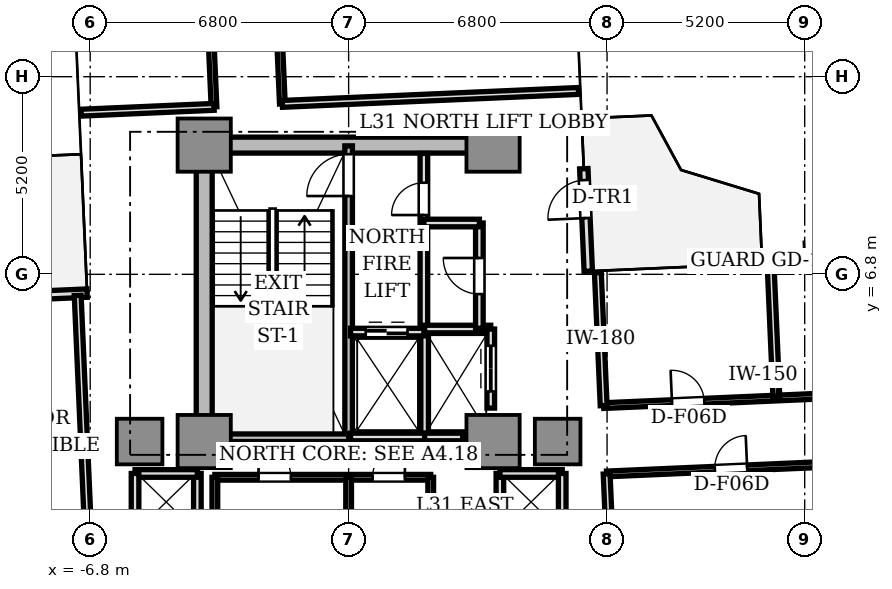
"""IFC4 building model, lengths in metres.
Left out: names, types, materials, properties, quantities, classifications, styles, units other than length and angle.
Written with IfcOpenShell. Run it as: python <this file> out.ifc"""

import sys

from ifc_helpers import new_model, si_unit, direction, frame, frame_2d, origin, origin_2d, place, context, subcontext, project, spatial, rectangle, extrude, source, transform, mapped, element, fill, save


model = new_model("IFC4")
c1 = context("Model", 3, precision=1e-05, world=origin(), true_north=direction((0.0, 1.0)))
c2 = subcontext(c1, "Body", "Model", "MODEL_VIEW")
j1 = project(units=[si_unit("LENGTHUNIT", "METRE"), si_unit("PLANEANGLEUNIT", "RADIAN")], contexts=[c1])
p1 = place(None, origin())
s1 = spatial("IfcSite", under=j1, at=p1, CompositionType="ELEMENT")
p2 = place(p1, origin())
s2 = spatial("IfcBuilding", under=s1, at=p2, CompositionType="ELEMENT")
p3 = place(p2, frame((0.0, 0.0, 114.8)))
s3 = spatial("IfcBuildingStorey", under=s2, at=p3, CompositionType="ELEMENT", Elevation=114.8)
p4 = place(p3, frame((-3.55, 10.2, 0.0), z_axis=(0.0, 0.0, 1.0), x_axis=(1.0, 0.0, 0.0)))
e1 = element("IfcWall", 1, at=p4, inside=s3, PredefinedType="SHEAR", context=c2, shape_type="SweptSolid", body=[
    extrude(rectangle(XDim=7.1, YDim=0.42, at=frame_2d((3.55, 0.0))), origin(), (0.0, 0.0, 1.0), 3.11),
])
p5 = place(p3, frame((-3.8, 2.85, 0.0), z_axis=(0.0, 0.0, 1.0), x_axis=(0.0, 1.0, 0.0)))
e2 = element("IfcWall", 2, at=p5, inside=s3, PredefinedType="SHEAR", context=c2, shape_type="SweptSolid", body=[
    extrude(rectangle(XDim=6.9, YDim=0.42, at=frame_2d((3.45, 0.0))), origin(), (0.0, 0.0, 1.0), 3.11),
])
m1 = source(origin(), c2, "Body", "SweptSolid", [
    extrude(rectangle(XDim=1.4, YDim=1.4, at=origin_2d()), origin(), (0.0, 0.0, 1.0), 3.11),
])
for number, where, z_axis, x_axis in (
    (3, (-3.8, 2.4, 0.0), (0.0, 0.0, 1.0), (1.0, 0.0, 0.0)),
    (4, (3.8, 2.4, 0.0), (0.0, 0.0, 1.0), (1.0, 0.0, 0.0)),
    (5, (-3.8, 10.2, 0.0), (0.0, 0.0, 1.0), (1.0, 0.0, 0.0)),
    (6, (3.8, 10.2, 0.0), (0.0, 0.0, 1.0), (1.0, 0.0, 0.0)),
):
    element("IfcColumn", number, at=place(p3, frame(where, z_axis=z_axis, x_axis=x_axis)), inside=s3, PredefinedType="COLUMN", context=c2, shape_type="MappedRepresentation", body=[
        mapped(m1, transform((0.0, 0.0, 0.0), scale=1.0)),
    ])
m2 = source(origin(), c2, "Body", "SweptSolid", [
    extrude(rectangle(XDim=1.2, YDim=1.2, at=origin_2d()), origin(), (0.0, 0.0, 1.0), 3.11),
])
for number, where, z_axis, x_axis in (
    (7, (5.5, 2.4, 0.0), (0.0, 0.0, 1.0), (1.0, 0.0, 0.0)),
    (8, (-5.5, 2.4, 0.0), (0.0, 0.0, 1.0), (1.0, 0.0, 0.0)),
):
    element("IfcColumn", number, at=place(p3, frame(where, z_axis=z_axis, x_axis=x_axis)), inside=s3, PredefinedType="COLUMN", context=c2, shape_type="MappedRepresentation", body=[
        mapped(m2, transform((0.0, 0.0, 0.0), scale=1.0)),
    ])
p6 = place(p3, frame((6.306, 6.882, 0.0), z_axis=(0.0, 0.0, 1.0), x_axis=(-0.043672655174, 0.999045894436, 0.0)))
e9 = element("IfcWall", 9, at=p6, inside=s3, PredefinedType="STANDARD", context=c2, shape_type="SweptSolid", body=[
    extrude(rectangle(XDim=2.7, YDim=0.22, at=frame_2d((1.35, 0.0))), origin(), (0.0, 0.0, 1.0), 3.11),
])
p7 = place(p6, frame((1.4, 0.0, 0.0)))
e10 = element("IfcOpeningElement", 10, at=p7, cuts=e9, PredefinedType="OPENING", context=c2, shape_type="SweptSolid", body=[
    extrude(rectangle(XDim=1.0, YDim=2.2, at=frame_2d((0.5, 1.1))), frame((0.0, 0.12, 0.0), z_axis=(0.0, -1.0, 0.0), x_axis=(1.0, 0.0, 0.0)), (0.0, 0.0, 1.0), 0.24),
])
p8 = place(p3, frame((-6.882, 6.306, 0.0), z_axis=(0.0, 0.0, 1.0), x_axis=(-0.999045894436, -0.043672655174, 0.0)))
e11 = element("IfcWall", 11, at=p8, inside=s3, PredefinedType="STANDARD", context=c2, shape_type="SweptSolid", body=[
    extrude(rectangle(XDim=2.7, YDim=0.22, at=frame_2d((1.35, 0.0))), origin(), (0.0, 0.0, 1.0), 3.11),
])
p9 = place(p8, frame((1.4, 0.0, 0.0)))
e12 = element("IfcOpeningElement", 12, at=p9, cuts=e11, PredefinedType="OPENING", context=c2, shape_type="SweptSolid", body=[
    extrude(rectangle(XDim=1.0, YDim=2.2, at=frame_2d((0.5, 1.1))), frame((0.0, 0.12, 0.0), z_axis=(0.0, -1.0, 0.0), x_axis=(1.0, 0.0, 0.0)), (0.0, 0.0, 1.0), 0.24),
])
p10 = place(p3, frame((0.0, 2.5, 0.0), z_axis=(0.0, 0.0, 1.0), x_axis=(0.0, 1.0, 0.0)))
e13 = element("IfcWall", 13, at=p10, inside=s3, PredefinedType="SOLIDWALL", context=c2, shape_type="SweptSolid", body=[
    extrude(rectangle(XDim=7.68, YDim=0.2, at=frame_2d((3.84, 0.0))), origin(), (0.0, 0.0, 1.0), 3.11),
])
p11 = place(p10, frame((6.36, 0.0, 0.0)))
e14 = element("IfcOpeningElement", 14, at=p11, cuts=e13, PredefinedType="OPENING", context=c2, shape_type="SweptSolid", body=[
    extrude(rectangle(XDim=1.1, YDim=2.15, at=frame_2d((0.55, 1.075))), frame((0.0, 0.11, 0.0), z_axis=(0.0, -1.0, 0.0), x_axis=(1.0, 0.0, 0.0)), (0.0, 0.0, 1.0), 0.22),
])
p12 = place(p3, frame((-3.72, 2.5, 0.0), z_axis=(0.0, 0.0, 1.0), x_axis=(1.0, 0.0, 0.0)))
e15 = element("IfcWall", 15, at=p12, inside=s3, PredefinedType="SOLIDWALL", context=c2, shape_type="SweptSolid", body=[
    extrude(rectangle(XDim=3.72, YDim=0.2, at=frame_2d((1.86, 0.0))), origin(), (0.0, 0.0, 1.0), 3.11),
])
p13 = place(p3, frame((1.98, 5.32, 0.0), z_axis=(0.0, 0.0, 1.0), x_axis=(0.0, 1.0, 0.0)))
e16 = element("IfcWall", 16, at=p13, inside=s3, PredefinedType="SOLIDWALL", context=c2, shape_type="SweptSolid", body=[
    extrude(rectangle(XDim=4.66, YDim=0.2, at=frame_2d((2.33, 0.0))), origin(), (0.0, 0.0, 1.0), 2.66),
])
p14 = place(p13, frame((3.04, 0.0, 0.0)))
e17 = element("IfcOpeningElement", 17, at=p14, cuts=e16, PredefinedType="OPENING", context=c2, shape_type="SweptSolid", body=[
    extrude(rectangle(XDim=0.85, YDim=2.1, at=frame_2d((0.425, 1.05))), frame((0.0, 0.11, 0.0), z_axis=(0.0, -1.0, 0.0), x_axis=(1.0, 0.0, 0.0)), (0.0, 0.0, 1.0), 0.22),
])
p15 = place(p3, frame((2.0, 2.5, 0.0), z_axis=(0.0, 0.0, 1.0), x_axis=(0.0, 1.0, 0.0)))
e18 = element("IfcWall", 18, at=p15, inside=s3, PredefinedType="SOLIDWALL", context=c2, shape_type="SweptSolid", body=[
    extrude(rectangle(XDim=2.78, YDim=0.2, at=frame_2d((1.39, 0.0))), origin(), (0.0, 0.0, 1.0), 2.66),
])
p16 = place(p3, frame((0.05, 2.52, 0.0), z_axis=(0.0, 0.0, 1.0), x_axis=(1.0, 0.0, 0.0)))
e19 = element("IfcWall", 19, at=p16, inside=s3, PredefinedType="SOLIDWALL", context=c2, shape_type="SweptSolid", body=[
    extrude(rectangle(XDim=1.95, YDim=0.2, at=frame_2d((0.975, 0.0))), origin(), (0.0, 0.0, 1.0), 2.66),
])
p17 = place(p3, frame((0.05, 5.28, 0.0), z_axis=(0.0, 0.0, 1.0), x_axis=(1.0, 0.0, 0.0)))
e20 = element("IfcWall", 20, at=p17, inside=s3, PredefinedType="SOLIDWALL", context=c2, shape_type="SweptSolid", body=[
    extrude(rectangle(XDim=1.93, YDim=0.2, at=frame_2d((0.965, 0.0))), origin(), (0.0, 0.0, 1.0), 2.66),
])
p18 = place(p17, frame((0.4, 0.0, 0.0)))
e21 = element("IfcOpeningElement", 21, at=p18, cuts=e20, PredefinedType="OPENING", context=c2, shape_type="SweptSolid", body=[
    extrude(rectangle(XDim=1.1, YDim=2.2, at=frame_2d((0.55, 1.1))), frame((0.0, 0.11, 0.0), z_axis=(0.0, -1.0, 0.0), x_axis=(1.0, 0.0, 0.0)), (0.0, 0.0, 1.0), 0.22),
])
p19 = place(p3, frame((2.0, 2.52, 0.0), z_axis=(0.0, 0.0, 1.0), x_axis=(1.0, 0.0, 0.0)))
e22 = element("IfcWall", 22, at=p19, inside=s3, PredefinedType="SOLIDWALL", context=c2, shape_type="SweptSolid", body=[
    extrude(rectangle(XDim=1.0, YDim=0.2, at=frame_2d((0.5, 0.0))), origin(), (0.0, 0.0, 1.0), 2.66),
])
p20 = place(p3, frame((2.0, 5.36, 0.0), z_axis=(0.0, 0.0, 1.0), x_axis=(1.0, 0.0, 0.0)))
e23 = element("IfcWall", 23, at=p20, inside=s3, PredefinedType="SOLIDWALL", context=c2, shape_type="SweptSolid", body=[
    extrude(rectangle(XDim=1.74, YDim=0.2, at=frame_2d((0.87, 0.0))), origin(), (0.0, 0.0, 1.0), 2.66),
])
p21 = place(p3, frame((3.74, 3.28, 0.0), z_axis=(0.0, 0.0, 1.0), x_axis=(0.0, 1.0, 0.0)))
e24 = element("IfcWall", 24, at=p21, inside=s3, PredefinedType="SOLIDWALL", context=c2, shape_type="SweptSolid", body=[
    extrude(rectangle(XDim=2.08, YDim=0.2, at=frame_2d((1.04, 0.0))), origin(), (0.0, 0.0, 1.0), 2.66),
])
p22 = place(p21, frame((0.44, 0.0, 0.0)))
e25 = element("IfcOpeningElement", 25, at=p22, cuts=e24, PredefinedType="OPENING", context=c2, shape_type="SweptSolid", body=[
    extrude(rectangle(XDim=1.2, YDim=2.2, at=frame_2d((0.6, 1.1))), frame((0.0, 0.11, 0.0), z_axis=(0.0, -1.0, 0.0), x_axis=(1.0, 0.0, 0.0)), (0.0, 0.0, 1.0), 0.22),
])
p23 = place(p3, frame((3.98, -1.56, 0.0), z_axis=(0.0, 0.0, 1.0), x_axis=(0.0, 1.0, 0.0)))
e26 = element("IfcWall", 26, at=p23, inside=s3, PredefinedType="SOLIDWALL", context=c2, shape_type="SweptSolid", body=[
    extrude(rectangle(XDim=3.12, YDim=0.2, at=frame_2d((1.56, 0.0))), origin(), (0.0, 0.0, 1.0), 2.28),
])
p24 = place(p3, frame((3.98, 1.56, 0.0), z_axis=(0.0, 0.0, 1.0), x_axis=(1.0, 0.0, 0.0)))
e27 = element("IfcWall", 27, at=p24, inside=s3, PredefinedType="SOLIDWALL", context=c2, shape_type="SweptSolid", body=[
    extrude(rectangle(XDim=1.64, YDim=0.2, at=frame_2d((0.82, 0.0))), origin(), (0.0, 0.0, 1.0), 2.66),
])
p25 = place(p3, frame((5.62, 0.0, 0.0), z_axis=(0.0, 0.0, 1.0), x_axis=(0.0, 1.0, 0.0)))
e28 = element("IfcWall", 28, at=p25, inside=s3, PredefinedType="SOLIDWALL", context=c2, shape_type="SweptSolid", body=[
    extrude(rectangle(XDim=1.56, YDim=0.2, at=frame_2d((0.78, 0.0))), origin(), (0.0, 0.0, 1.0), 2.66),
])
p26 = place(p3, frame((-3.98, -1.56, 0.0), z_axis=(0.0, 0.0, 1.0), x_axis=(0.0, 1.0, 0.0)))
e29 = element("IfcWall", 29, at=p26, inside=s3, PredefinedType="SOLIDWALL", context=c2, shape_type="SweptSolid", body=[
    extrude(rectangle(XDim=3.12, YDim=0.2, at=frame_2d((1.56, 0.0))), origin(), (0.0, 0.0, 1.0), 2.28),
])
p27 = place(p3, frame((-5.62, 1.56, 0.0), z_axis=(0.0, 0.0, 1.0), x_axis=(1.0, 0.0, 0.0)))
e30 = element("IfcWall", 30, at=p27, inside=s3, PredefinedType="SOLIDWALL", context=c2, shape_type="SweptSolid", body=[
    extrude(rectangle(XDim=1.64, YDim=0.2, at=frame_2d((0.82, 0.0))), origin(), (0.0, 0.0, 1.0), 2.66),
])
p28 = place(p3, frame((-5.62, 0.0, 0.0), z_axis=(0.0, 0.0, 1.0), x_axis=(0.0, 1.0, 0.0)))
e31 = element("IfcWall", 31, at=p28, inside=s3, PredefinedType="SOLIDWALL", context=c2, shape_type="SweptSolid", body=[
    extrude(rectangle(XDim=1.56, YDim=0.2, at=frame_2d((0.78, 0.0))), origin(), (0.0, 0.0, 1.0), 2.66),
])
p29 = place(p3, frame((3.44, 5.38, 0.0), z_axis=(0.0, 0.0, 1.0), x_axis=(0.0, 1.0, 0.0)))
e32 = element("IfcWall", 32, at=p29, inside=s3, PredefinedType="SOLIDWALL", context=c2, shape_type="SweptSolid", body=[
    extrude(rectangle(XDim=2.77, YDim=0.2, at=frame_2d((1.385, 0.0))), origin(), (0.0, 0.0, 1.0), 2.66),
])
p30 = place(p29, frame((0.9, 0.0, 0.0)))
e33 = element("IfcOpeningElement", 33, at=p30, cuts=e32, PredefinedType="OPENING", context=c2, shape_type="SweptSolid", body=[
    extrude(rectangle(XDim=0.95, YDim=2.15, at=frame_2d((0.475, 1.075))), frame((0.0, 0.11, 0.0), z_axis=(0.0, -1.0, 0.0), x_axis=(1.0, 0.0, 0.0)), (0.0, 0.0, 1.0), 0.22),
])
p31 = place(p3, frame((1.98, 8.15, 0.0), z_axis=(0.0, 0.0, 1.0), x_axis=(1.0, 0.0, 0.0)))
e34 = element("IfcWall", 34, at=p31, inside=s3, PredefinedType="SOLIDWALL", context=c2, shape_type="SweptSolid", body=[
    extrude(rectangle(XDim=1.46, YDim=0.2, at=frame_2d((0.73, 0.0))), origin(), (0.0, 0.0, 1.0), 2.66),
])
p32 = place(p3, frame((-3.52, 1.46, 0.0), z_axis=(0.0, 0.0, 1.0), x_axis=(1.0, 0.0, 0.0)))
e35 = element("IfcWall", 35, at=p32, inside=s3, PredefinedType="PARTITIONING", context=c2, shape_type="SweptSolid", body=[
    extrude(rectangle(XDim=5.68, YDim=0.15, at=frame_2d((2.84, 0.0))), origin(), (0.0, 0.0, 1.0), 2.66),
])
p33 = place(p32, frame((1.15, 0.0, 0.0)))
e36 = element("IfcOpeningElement", 36, at=p33, cuts=e35, PredefinedType="OPENING", context=c2, shape_type="SweptSolid", body=[
    extrude(rectangle(XDim=0.85, YDim=2.1, at=frame_2d((0.425, 1.05))), frame((0.0, 0.085, 0.0), z_axis=(0.0, -1.0, 0.0), x_axis=(1.0, 0.0, 0.0)), (0.0, 0.0, 1.0), 0.17),
])
p34 = place(p32, frame((4.15, 0.0, 0.0)))
e37 = element("IfcOpeningElement", 37, at=p34, cuts=e35, PredefinedType="OPENING", context=c2, shape_type="SweptSolid", body=[
    extrude(rectangle(XDim=0.85, YDim=2.1, at=frame_2d((0.425, 1.05))), frame((0.0, 0.085, 0.0), z_axis=(0.0, -1.0, 0.0), x_axis=(1.0, 0.0, 0.0)), (0.0, 0.0, 1.0), 0.17),
])
p35 = place(p3, frame((-3.52, 0.1, 0.0), z_axis=(0.0, 0.0, 1.0), x_axis=(0.0, 1.0, 0.0)))
e38 = element("IfcWall", 38, at=p35, inside=s3, PredefinedType="PARTITIONING", context=c2, shape_type="SweptSolid", body=[
    extrude(rectangle(XDim=1.36, YDim=0.15, at=frame_2d((0.68, 0.0))), origin(), (0.0, 0.0, 1.0), 2.28),
])
for number, where, z_axis, x_axis in (
    (39, (2.16, 0.1, 0.0), (0.0, 0.0, 1.0), (0.0, 1.0, 0.0)),
    (40, (0.0, 0.1, 0.0), (0.0, 0.0, 1.0), (0.0, 1.0, 0.0)),
):
    element("IfcWall", number, at=place(p3, frame(where, z_axis=z_axis, x_axis=x_axis)), inside=s3, PredefinedType="PARTITIONING", context=c2, shape_type="SweptSolid", body=[
        extrude(rectangle(XDim=1.36, YDim=0.15, at=frame_2d((0.68, 0.0))), origin(), (0.0, 0.0, 1.0), 2.66),
    ])
p36 = place(p3, frame((6.71, 3.346, 0.0), z_axis=(0.0, 0.0, 1.0), x_axis=(0.999048041751, 0.043623505985, 0.0)))
e41 = element("IfcWall", 41, at=p36, inside=s3, PredefinedType="PARTITIONING", context=c2, shape_type="SweptSolid", body=[
    extrude(rectangle(XDim=9.1, YDim=0.15, at=frame_2d((4.55, 0.0))), origin(), (0.0, 0.0, 1.0), 2.63),
])
p37 = place(p36, frame((1.8, 0.0, 0.0)))
e42 = element("IfcOpeningElement", 42, at=p37, cuts=e41, PredefinedType="OPENING", context=c2, shape_type="SweptSolid", body=[
    extrude(rectangle(XDim=0.85, YDim=2.1, at=frame_2d((0.425, 1.05))), frame((0.0, 0.085, 0.0), z_axis=(0.0, -1.0, 0.0), x_axis=(1.0, 0.0, 0.0)), (0.0, 0.0, 1.0), 0.17),
])
p38 = place(p36, frame((6.35, 0.0, 0.0)))
e43 = element("IfcOpeningElement", 43, at=p38, cuts=e41, PredefinedType="OPENING", context=c2, shape_type="SweptSolid", body=[
    extrude(rectangle(XDim=0.85, YDim=2.1, at=frame_2d((0.425, 1.05))), frame((0.0, 0.085, 0.0), z_axis=(0.0, -1.0, 0.0), x_axis=(1.0, 0.0, 0.0)), (0.0, 0.0, 1.0), 0.17),
])
p39 = place(p3, frame((6.789, 1.548, 0.0), z_axis=(0.0, 0.0, 1.0), x_axis=(0.999048041751, 0.043623505985, 0.0)))
e44 = element("IfcWall", 44, at=p39, inside=s3, PredefinedType="PARTITIONING", context=c2, shape_type="SweptSolid", body=[
    extrude(rectangle(XDim=9.1, YDim=0.15, at=frame_2d((4.55, 0.0))), origin(), (0.0, 0.0, 1.0), 2.66),
])
p40 = place(p39, frame((2.85, 0.0, 0.0)))
e45 = element("IfcOpeningElement", 45, at=p40, cuts=e44, PredefinedType="OPENING", context=c2, shape_type="SweptSolid", body=[
    extrude(rectangle(XDim=0.85, YDim=2.1, at=frame_2d((0.425, 1.05))), frame((0.0, 0.085, 0.0), z_axis=(0.0, -1.0, 0.0), x_axis=(1.0, 0.0, 0.0)), (0.0, 0.0, 1.0), 0.17),
])
p41 = place(p3, frame((6.71, 3.346, 0.0), z_axis=(0.0, 0.0, 1.0), x_axis=(-0.043597663116, 0.999049169846, 0.0)))
e46 = element("IfcWall", 46, at=p41, inside=s3, PredefinedType="PARTITIONING", context=c2, shape_type="SweptSolid", body=[
    extrude(rectangle(XDim=3.5, YDim=0.18, at=frame_2d((1.75, 0.0))), origin(), (0.0, 0.0, 1.0), 2.66),
])
p42 = place(p3, frame((7.129, -6.245, 0.0), z_axis=(0.0, 0.0, 1.0), x_axis=(-0.043600217373, 0.999049058378, 0.0)))
e47 = element("IfcWall", 47, at=p42, inside=s3, PredefinedType="PARTITIONING", context=c2, shape_type="SweptSolid", body=[
    extrude(rectangle(XDim=7.8, YDim=0.18, at=frame_2d((3.9, 0.0))), origin(), (0.0, 0.0, 1.0), 2.66),
])
p43 = place(p3, frame((11.256, 3.544, 0.0), z_axis=(0.0, 0.0, 1.0), x_axis=(-0.043597663116, 0.999049169846, 0.0)))
e48 = element("IfcWall", 48, at=p43, inside=s3, PredefinedType="PARTITIONING", context=c2, shape_type="SweptSolid", body=[
    extrude(rectangle(XDim=3.5, YDim=0.18, at=frame_2d((1.75, 0.0))), origin(), (0.0, 0.0, 1.0), 2.66),
])
p44 = place(p3, frame((-3.542, 11.206, 0.0), z_axis=(0.0, 0.0, 1.0), x_axis=(-0.043604692074, 0.999048863084, 0.0)))
e49 = element("IfcWall", 49, at=p44, inside=s3, PredefinedType="PARTITIONING", context=c2, shape_type="SweptSolid", body=[
    extrude(rectangle(XDim=9.3, YDim=0.15, at=frame_2d((4.65, 0.0))), origin(), (0.0, 0.0, 1.0), 2.66),
])
p45 = place(p44, frame((1.85, 0.0, 0.0)))
e50 = element("IfcOpeningElement", 50, at=p45, cuts=e49, PredefinedType="OPENING", context=c2, shape_type="SweptSolid", body=[
    extrude(rectangle(XDim=0.85, YDim=2.1, at=frame_2d((0.425, 1.05))), frame((0.0, 0.085, 0.0), z_axis=(0.0, -1.0, 0.0), x_axis=(1.0, 0.0, 0.0)), (0.0, 0.0, 1.0), 0.17),
])
p46 = place(p44, frame((6.5, 0.0, 0.0)))
e51 = element("IfcOpeningElement", 51, at=p46, cuts=e49, PredefinedType="OPENING", context=c2, shape_type="SweptSolid", body=[
    extrude(rectangle(XDim=0.85, YDim=2.1, at=frame_2d((0.425, 1.05))), frame((0.0, 0.085, 0.0), z_axis=(0.0, -1.0, 0.0), x_axis=(1.0, 0.0, 0.0)), (0.0, 0.0, 1.0), 0.17),
])
p47 = place(p3, frame((-1.744, 11.285, 0.0), z_axis=(0.0, 0.0, 1.0), x_axis=(-0.043630894187, 0.999047719117, 0.0)))
e52 = element("IfcWall", 52, at=p47, inside=s3, PredefinedType="PARTITIONING", context=c2, shape_type="SweptSolid", body=[
    extrude(rectangle(XDim=9.3, YDim=0.15, at=frame_2d((4.65, 0.0))), origin(), (0.0, 0.0, 1.0), 2.66),
])
p48 = place(p47, frame((2.95, 0.0, 0.0)))
e53 = element("IfcOpeningElement", 53, at=p48, cuts=e52, PredefinedType="OPENING", context=c2, shape_type="SweptSolid", body=[
    extrude(rectangle(XDim=0.85, YDim=2.1, at=frame_2d((0.425, 1.05))), frame((0.0, 0.085, 0.0), z_axis=(0.0, -1.0, 0.0), x_axis=(1.0, 0.0, 0.0)), (0.0, 0.0, 1.0), 0.17),
])
p49 = place(p3, frame((-3.542, 11.206, 0.0), z_axis=(0.0, 0.0, 1.0), x_axis=(-0.999046129111, -0.04366728647, 0.0)))
e54 = element("IfcWall", 54, at=p49, inside=s3, PredefinedType="PARTITIONING", context=c2, shape_type="SweptSolid", body=[
    extrude(rectangle(XDim=3.5, YDim=0.18, at=frame_2d((1.75, 0.0))), origin(), (0.0, 0.0, 1.0), 2.66),
])
p50 = place(p3, frame((6.049, 11.625, 0.0), z_axis=(0.0, 0.0, 1.0), x_axis=(-0.999047634936, -0.043632821702, 0.0)))
e55 = element("IfcWall", 55, at=p50, inside=s3, PredefinedType="PARTITIONING", context=c2, shape_type="SweptSolid", body=[
    extrude(rectangle(XDim=7.8, YDim=0.18, at=frame_2d((3.9, 0.0))), origin(), (0.0, 0.0, 1.0), 2.66),
])
p51 = place(p3, frame((-7.129, 6.245, 0.0), z_axis=(0.0, 0.0, 1.0), x_axis=(0.043600217373, -0.999049058378, 0.0)))
e56 = element("IfcWall", 56, at=p51, inside=s3, PredefinedType="PARTITIONING", context=c2, shape_type="SweptSolid", body=[
    extrude(rectangle(XDim=7.8, YDim=0.18, at=frame_2d((3.9, 0.0))), origin(), (0.0, 0.0, 1.0), 2.66),
])
m3 = source(origin(), c2, "Body", "SweptSolid", [
    extrude(rectangle(XDim=1.0, YDim=0.05, at=origin_2d()), origin(), (0.0, 0.0, 1.0), 2.2),
])
p52 = place(p7, frame((0.5, 0.0, 0.0)))
e57 = element("IfcDoor", 57, at=p52, inside=s3, OperationType="SINGLE_SWING_LEFT", PredefinedType="DOOR", context=c2, shape_type="MappedRepresentation", body=[
    mapped(m3, transform((0.0, 0.0, 0.0), scale=1.0)),
])
fill(e10, e57)
m4 = source(origin(), c2, "Body", "SweptSolid", [
    extrude(rectangle(XDim=1.1, YDim=0.05, at=origin_2d()), origin(), (0.0, 0.0, 1.0), 2.15),
])
p53 = place(p11, frame((0.55, 0.0, 0.0)))
e58 = element("IfcDoor", 58, at=p53, inside=s3, OperationType="SINGLE_SWING_LEFT", PredefinedType="DOOR", context=c2, shape_type="MappedRepresentation", body=[
    mapped(m4, transform((0.0, 0.0, 0.0), scale=1.0)),
])
fill(e14, e58)
m5 = source(origin(), c2, "Body", "SweptSolid", [
    extrude(rectangle(XDim=0.85, YDim=0.05, at=origin_2d()), origin(), (0.0, 0.0, 1.0), 2.1),
])
p54 = place(p14, frame((0.425, 0.0, 0.0)))
e59 = element("IfcDoor", 59, at=p54, inside=s3, OperationType="SINGLE_SWING_LEFT", PredefinedType="DOOR", context=c2, shape_type="MappedRepresentation", body=[
    mapped(m5, transform((0.0, 0.0, 0.0), scale=1.0)),
])
fill(e17, e59)
m6 = source(origin(), c2, "Body", "SweptSolid", [
    extrude(rectangle(XDim=1.1, YDim=0.05, at=origin_2d()), origin(), (0.0, 0.0, 1.0), 2.2),
])
p55 = place(p18, frame((0.55, 0.0, 0.0)))
e60 = element("IfcDoor", 60, at=p55, inside=s3, OperationType="DOUBLE_DOOR_SLIDING", PredefinedType="DOOR", context=c2, shape_type="MappedRepresentation", body=[
    mapped(m6, transform((0.0, 0.0, 0.0), scale=1.0)),
])
fill(e21, e60)
m7 = source(origin(), c2, "Body", "SweptSolid", [
    extrude(rectangle(XDim=1.2, YDim=0.05, at=origin_2d()), origin(), (0.0, 0.0, 1.0), 2.2),
])
p56 = place(p22, frame((0.6, 0.0, 0.0)))
e61 = element("IfcDoor", 61, at=p56, inside=s3, OperationType="DOUBLE_DOOR_SLIDING", PredefinedType="DOOR", context=c2, shape_type="MappedRepresentation", body=[
    mapped(m7, transform((0.0, 0.0, 0.0), scale=1.0)),
])
fill(e25, e61)
m8 = source(origin(), c2, "Body", "SweptSolid", [
    extrude(rectangle(XDim=0.95, YDim=0.05, at=origin_2d()), origin(), (0.0, 0.0, 1.0), 2.15),
])
p57 = place(p30, frame((0.475, 0.0, 0.0)))
e62 = element("IfcDoor", 62, at=p57, inside=s3, OperationType="SINGLE_SWING_RIGHT", PredefinedType="DOOR", context=c2, shape_type="MappedRepresentation", body=[
    mapped(m8, transform((0.0, 0.0, 0.0), scale=1.0)),
])
fill(e33, e62)
p58 = place(p33, frame((0.425, 0.0, 0.0)))
e63 = element("IfcDoor", 63, at=p58, inside=s3, OperationType="SINGLE_SWING_LEFT", PredefinedType="DOOR", context=c2, shape_type="MappedRepresentation", body=[
    mapped(m5, transform((0.0, 0.0, 0.0), scale=1.0)),
])
fill(e36, e63)
p59 = place(p34, frame((0.425, 0.0, 0.0)))
e64 = element("IfcDoor", 64, at=p59, inside=s3, OperationType="SINGLE_SWING_RIGHT", PredefinedType="DOOR", context=c2, shape_type="MappedRepresentation", body=[
    mapped(m5, transform((0.0, 0.0, 0.0), scale=1.0)),
])
fill(e37, e64)
p60 = place(p37, frame((0.425, 0.0, 0.0)))
e65 = element("IfcDoor", 65, at=p60, inside=s3, OperationType="SINGLE_SWING_LEFT", PredefinedType="DOOR", context=c2, shape_type="MappedRepresentation", body=[
    mapped(m5, transform((0.0, 0.0, 0.0), scale=1.0)),
])
fill(e42, e65)
p61 = place(p40, frame((0.425, 0.0, 0.0)))
e66 = element("IfcDoor", 66, at=p61, inside=s3, OperationType="SINGLE_SWING_RIGHT", PredefinedType="DOOR", context=c2, shape_type="MappedRepresentation", body=[
    mapped(m5, transform((0.0, 0.0, 0.0), scale=1.0)),
])
fill(e45, e66)
save(model, sys.argv[1])
